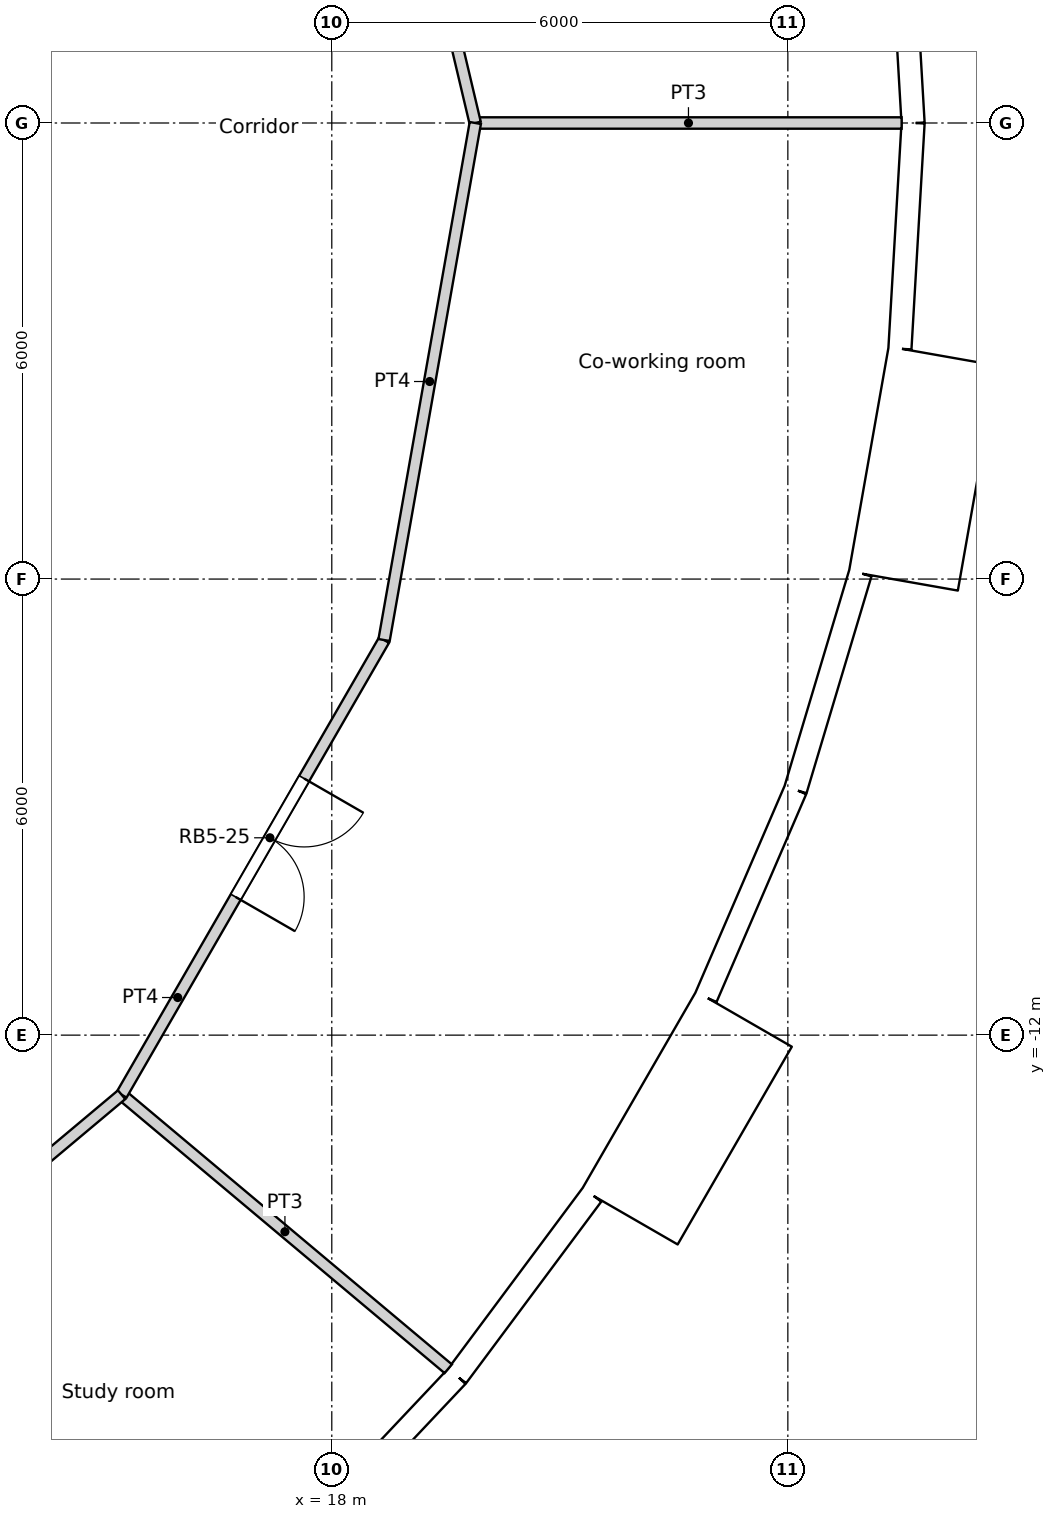
"""IFC4 building model, lengths in metres.
Left out: names, types, materials, properties, quantities, classifications, styles, units other than length and angle.
Written with IfcOpenShell. Run it as: python <this file> out.ifc"""

import sys

from ifc_helpers import new_model, si_unit, direction, frame, frame_2d, origin, origin_2d, place, context, subcontext, project, spatial, rectangle, circle, extrude, element, fill, save


model = new_model("IFC4")
c1 = context("Model", 3, precision=1e-05, world=origin(), true_north=direction((0.0, 1.0)))
c2 = subcontext(c1, "Body", "Model", "MODEL_VIEW")
j1 = project(units=[si_unit("LENGTHUNIT", "METRE"), si_unit("PLANEANGLEUNIT", "RADIAN")], contexts=[c1])
p1 = place(None, origin())
s1 = spatial("IfcSite", under=j1, at=p1, CompositionType="ELEMENT")
p2 = place(p1, origin())
s2 = spatial("IfcBuilding", under=s1, at=p2, CompositionType="ELEMENT")
p3 = place(p2, frame((0.0, 0.0, 169.2)))
s3 = spatial("IfcBuildingStorey", under=s2, at=p3, CompositionType="ELEMENT", Elevation=169.2)
for number, where, z_axis, x_axis in (
    (1, (24.548, 0.0, 0.0), (0.0, 0.0, 1.0), (1.0, 0.0, 0.0)),
    (2, (18.805, -15.779, 0.0), (0.0, 0.0, 1.0), (1.0, 0.0, 0.0)),
    (3, (21.937, -11.017, 0.0), (0.0, 0.0, 1.0), (1.0, 0.0, 0.0)),
    (4, (23.886, -5.661, 0.0), (0.0, 0.0, 1.0), (1.0, 0.0, 0.0)),
):
    element("IfcColumn", number, at=place(p3, frame(where, z_axis=z_axis, x_axis=x_axis)), inside=s3, PredefinedType="COLUMN", context=c2, shape_type="SweptSolid", body=[
        extrude(circle(Radius=0.6, at=origin_2d()), origin(), (0.0, 0.0, 1.0), 3.6),
    ])
for number, where, z_axis, x_axis in (
    (5, (18.822, 0.0, 0.0), (0.0, 0.0, 1.0), (1.0, 0.0, 0.0)),
    (6, (15.552, -10.603, 0.0), (0.0, 0.0, 1.0), (1.0, 0.0, 0.0)),
    (7, (17.986, -5.548, 0.0), (0.0, 0.0, 1.0), (1.0, 0.0, 0.0)),
):
    element("IfcColumn", number, at=place(p3, frame(where, z_axis=z_axis, x_axis=x_axis)), inside=s3, PredefinedType="COLUMN", context=c2, shape_type="SweptSolid", body=[
        extrude(circle(Radius=0.65, at=origin_2d()), origin(), (0.0, 0.0, 1.0), 3.6),
    ])
p4 = place(p3, frame((25.647, 0.0, 0.0), z_axis=(0.0, 0.0, 1.0), x_axis=(-0.058144307138, 0.998308188661, 0.0)))
e8 = element("IfcWall", 8, at=p4, inside=s3, PredefinedType="SOLIDWALL", context=c2, shape_type="SweptSolid", body=[
    extrude(rectangle(XDim=2.973, YDim=0.3, at=frame_2d((1.486, 0.0))), origin(), (0.0, 0.0, 1.0), 3.3),
])
p5 = place(p4, frame((1.486, 0.0, 1.55)))
e9 = element("IfcOpeningElement", 9, at=p5, cuts=e8, PredefinedType="OPENING", context=c2, shape_type="SweptSolid", body=[
    extrude(circle(Radius=0.9, at=origin_2d()), frame((0.0, 0.16, 0.0), z_axis=(0.0, -1.0, 0.0), x_axis=(1.0, 0.0, 0.0)), (0.0, 0.0, 1.0), 0.32),
])
p6 = place(p3, frame((17.607, -18.648, 0.0), z_axis=(0.0, 0.0, 1.0), x_axis=(0.686235184166, 0.727379730273, 0.0)))
e10 = element("IfcWall", 10, at=p6, inside=s3, PredefinedType="SOLIDWALL", context=c2, shape_type="SweptSolid", body=[
    extrude(rectangle(XDim=2.973, YDim=0.3, at=frame_2d((1.486, 0.0))), origin(), (0.0, 0.0, 1.0), 3.3),
])
p7 = place(p6, frame((1.486, 0.0, 1.55)))
e11 = element("IfcOpeningElement", 11, at=p7, cuts=e10, PredefinedType="OPENING", context=c2, shape_type="SweptSolid", body=[
    extrude(circle(Radius=0.9, at=origin_2d()), frame((0.0, 0.16, 0.0), z_axis=(0.0, -1.0, 0.0), x_axis=(1.0, 0.0, 0.0)), (0.0, 0.0, 1.0), 0.32),
])
p8 = place(p3, frame((19.647, -16.486, 0.0), z_axis=(0.0, 0.0, 1.0), x_axis=(0.597197580538, 0.80209416517, 0.0)))
e12 = element("IfcWall", 12, at=p8, inside=s3, PredefinedType="SOLIDWALL", context=c2, shape_type="SweptSolid", body=[
    extrude(rectangle(XDim=2.973, YDim=0.3, at=frame_2d((1.486, 0.0))), origin(), (0.0, 0.0, 1.0), 3.3),
])
p9 = place(p8, frame((1.486, 0.0, 1.55)))
e13 = element("IfcOpeningElement", 13, at=p9, cuts=e12, PredefinedType="OPENING", context=c2, shape_type="SweptSolid", body=[
    extrude(circle(Radius=0.9, at=origin_2d()), frame((0.0, 0.16, 0.0), z_axis=(0.0, -1.0, 0.0), x_axis=(1.0, 0.0, 0.0)), (0.0, 0.0, 1.0), 0.32),
])
p10 = place(p3, frame((21.922, -14.389, -0.3), z_axis=(0.0, 0.0, 1.0), x_axis=(0.499990139034, 0.866031096941, 0.0)))
e14 = element("IfcWall", 14, at=p10, inside=s3, PredefinedType="ELEMENTEDWALL", context=c2, shape_type="SweptSolid", body=[
    extrude(rectangle(XDim=3.0, YDim=1.45, at=frame_2d((1.5, 0.0))), origin(), (0.0, 0.0, 1.0), 3.6),
])
p11 = place(p10, frame((1.5, 0.0, 1.85)))
e15 = element("IfcOpeningElement", 15, at=p11, cuts=e14, PredefinedType="OPENING", context=c2, shape_type="SweptSolid", body=[
    extrude(circle(Radius=0.9, at=origin_2d()), frame((0.0, 0.735, 0.0), z_axis=(0.0, -1.0, 0.0), x_axis=(1.0, 0.0, 0.0)), (0.0, 0.0, 1.0), 1.47),
])
p12 = place(p3, frame((22.923, -11.502, 0.0), z_axis=(0.0, 0.0, 1.0), x_axis=(0.396148129016, 0.918186614952, 0.0)))
e16 = element("IfcWall", 16, at=p12, inside=s3, PredefinedType="SOLIDWALL", context=c2, shape_type="SweptSolid", body=[
    extrude(rectangle(XDim=2.973, YDim=0.3, at=frame_2d((1.486, 0.0))), origin(), (0.0, 0.0, 1.0), 3.3),
])
p13 = place(p12, frame((1.486, 0.0, 1.55)))
e17 = element("IfcOpeningElement", 17, at=p13, cuts=e16, PredefinedType="OPENING", context=c2, shape_type="SweptSolid", body=[
    extrude(circle(Radius=0.9, at=origin_2d()), frame((0.0, 0.16, 0.0), z_axis=(0.0, -1.0, 0.0), x_axis=(1.0, 0.0, 0.0)), (0.0, 0.0, 1.0), 0.32),
])
p14 = place(p3, frame((24.101, -8.772, 0.0), z_axis=(0.0, 0.0, 1.0), x_axis=(0.286782750849, 0.957995643944, 0.0)))
e18 = element("IfcWall", 18, at=p14, inside=s3, PredefinedType="SOLIDWALL", context=c2, shape_type="SweptSolid", body=[
    extrude(rectangle(XDim=2.973, YDim=0.3, at=frame_2d((1.486, 0.0))), origin(), (0.0, 0.0, 1.0), 3.3),
])
p15 = place(p14, frame((1.486, 0.0, 1.55)))
e19 = element("IfcOpeningElement", 19, at=p15, cuts=e18, PredefinedType="OPENING", context=c2, shape_type="SweptSolid", body=[
    extrude(circle(Radius=0.9, at=origin_2d()), frame((0.0, 0.16, 0.0), z_axis=(0.0, -1.0, 0.0), x_axis=(1.0, 0.0, 0.0)), (0.0, 0.0, 1.0), 0.32),
])
p16 = place(p3, frame((25.521, -6.023, -0.3), z_axis=(0.0, 0.0, 1.0), x_axis=(0.173669267716, 0.984804034035, 0.0)))
e20 = element("IfcWall", 20, at=p16, inside=s3, PredefinedType="ELEMENTEDWALL", context=c2, shape_type="SweptSolid", body=[
    extrude(rectangle(XDim=3.0, YDim=1.45, at=frame_2d((1.5, 0.0))), origin(), (0.0, 0.0, 1.0), 3.6),
])
p17 = place(p16, frame((1.5, 0.0, 1.85)))
e21 = element("IfcOpeningElement", 21, at=p17, cuts=e20, PredefinedType="OPENING", context=c2, shape_type="SweptSolid", body=[
    extrude(circle(Radius=0.9, at=origin_2d()), frame((0.0, 0.735, 0.0), z_axis=(0.0, -1.0, 0.0), x_axis=(1.0, 0.0, 0.0)), (0.0, 0.0, 1.0), 1.47),
])
p18 = place(p3, frame((25.475, -2.968, 0.0), z_axis=(0.0, 0.0, 1.0), x_axis=(0.058144307138, 0.998308188661, 0.0)))
e22 = element("IfcWall", 22, at=p18, inside=s3, PredefinedType="SOLIDWALL", context=c2, shape_type="SweptSolid", body=[
    extrude(rectangle(XDim=2.973, YDim=0.3, at=frame_2d((1.486, 0.0))), origin(), (0.0, 0.0, 1.0), 3.3),
])
p19 = place(p18, frame((1.486, 0.0, 1.55)))
e23 = element("IfcOpeningElement", 23, at=p19, cuts=e22, PredefinedType="OPENING", context=c2, shape_type="SweptSolid", body=[
    extrude(circle(Radius=0.9, at=origin_2d()), frame((0.0, 0.16, 0.0), z_axis=(0.0, -1.0, 0.0), x_axis=(1.0, 0.0, 0.0)), (0.0, 0.0, 1.0), 0.32),
])
p20 = place(p3, frame((17.772, 8.926, 0.0), z_axis=(0.0, 0.0, 1.0), x_axis=(0.230531374136, -0.973064892769, 0.0)))
e24 = element("IfcWall", 24, at=p20, inside=s3, PredefinedType="PARTITIONING", context=c2, shape_type="SweptSolid", body=[
    extrude(rectangle(XDim=9.173, YDim=0.15, at=frame_2d((4.587, 0.0))), origin(), (0.0, 0.0, 1.0), 3.3),
])
p21 = place(p20, frame((0.973, 0.0, 0.0)))
e25 = element("IfcOpeningElement", 25, at=p21, cuts=e24, PredefinedType="OPENING", context=c2, shape_type="SweptSolid", body=[
    extrude(rectangle(XDim=1.0, YDim=2.1, at=frame_2d((0.5, 1.05))), frame((0.0, 0.075, 0.0), z_axis=(0.0, -1.0, 0.0), x_axis=(1.0, 0.0, 0.0)), (0.0, 0.0, 1.0), 0.15),
])
p22 = place(p3, frame((9.943, -17.222, 0.0), z_axis=(0.0, 0.0, 1.0), x_axis=(0.766192104565, 0.642611592567, 0.0)))
e26 = element("IfcWall", 26, at=p22, inside=s3, PredefinedType="PARTITIONING", context=c2, shape_type="SweptSolid", body=[
    extrude(rectangle(XDim=6.906, YDim=0.15, at=frame_2d((3.453, 0.0))), origin(), (0.0, 0.0, 1.0), 3.3),
])
p23 = place(p22, frame((0.984, 0.0, 0.0)))
e27 = element("IfcOpeningElement", 27, at=p23, cuts=e26, PredefinedType="OPENING", context=c2, shape_type="SweptSolid", body=[
    extrude(rectangle(XDim=1.0, YDim=2.04, at=frame_2d((0.5, 1.02))), frame((0.0, 0.075, 0.0), z_axis=(0.0, -1.0, 0.0), x_axis=(1.0, 0.0, 0.0)), (0.0, 0.0, 1.0), 0.15),
])
p24 = place(p3, frame((18.688, -6.802, 0.0), z_axis=(0.0, 0.0, 1.0), x_axis=(0.173728873845, 0.98479352069, 0.0)))
e28 = element("IfcWall", 28, at=p24, inside=s3, PredefinedType="PARTITIONING", context=c2, shape_type="SweptSolid", body=[
    extrude(rectangle(XDim=6.907, YDim=0.15, at=frame_2d((3.454, 0.0))), origin(), (0.0, 0.0, 1.0), 3.3),
])
p25 = place(p3, frame((15.235, -12.784, 0.0), z_axis=(0.0, 0.0, 1.0), x_axis=(0.499914202267, 0.866074933462, 0.0)))
e29 = element("IfcWall", 29, at=p25, inside=s3, PredefinedType="PARTITIONING", context=c2, shape_type="SweptSolid", body=[
    extrude(rectangle(XDim=6.907, YDim=0.15, at=frame_2d((3.454, 0.0))), origin(), (0.0, 0.0, 1.0), 3.3),
])
p26 = place(p25, frame((3.003, 0.0, 0.0)))
e30 = element("IfcOpeningElement", 30, at=p26, cuts=e29, PredefinedType="OPENING", context=c2, shape_type="SweptSolid", body=[
    extrude(rectangle(XDim=1.8, YDim=2.1, at=frame_2d((0.9, 1.05))), frame((0.0, 0.075, 0.0), z_axis=(0.0, -1.0, 0.0), x_axis=(1.0, 0.0, 0.0)), (0.0, 0.0, 1.0), 0.15),
])
p27 = place(p3, frame((19.888, 0.0, 0.0), z_axis=(0.0, 0.0, 1.0), x_axis=(1.0, 0.0, 0.0)))
e31 = element("IfcWall", 31, at=p27, inside=s3, PredefinedType="PARTITIONING", context=c2, shape_type="SweptSolid", body=[
    extrude(rectangle(XDim=5.609, YDim=0.15, at=frame_2d((2.805, 0.0))), origin(), (0.0, 0.0, 1.0), 3.3),
])
p28 = place(p3, frame((15.235, -12.784, 0.0), z_axis=(0.0, 0.0, 1.0), x_axis=(0.76609059793, -0.642732600514, 0.0)))
e32 = element("IfcWall", 32, at=p28, inside=s3, PredefinedType="PARTITIONING", context=c2, shape_type="SweptSolid", body=[
    extrude(rectangle(XDim=5.609, YDim=0.15, at=frame_2d((2.804, 0.0))), origin(), (0.0, 0.0, 1.0), 3.3),
])
p29 = place(p5, origin())
e33 = element("IfcWindow", 33, at=p29, inside=s3, PartitioningType="SINGLE_PANEL", PredefinedType="WINDOW", context=c2, shape_type="SweptSolid", body=[
    extrude(circle(Radius=0.9, at=origin_2d()), frame((0.0, 0.12, 0.0), z_axis=(0.0, -1.0, 0.0), x_axis=(1.0, 0.0, 0.0)), (0.0, 0.0, 1.0), 0.1),
])
fill(e9, e33)
p30 = place(p7, origin())
e34 = element("IfcWindow", 34, at=p30, inside=s3, PartitioningType="SINGLE_PANEL", PredefinedType="WINDOW", context=c2, shape_type="SweptSolid", body=[
    extrude(circle(Radius=0.9, at=origin_2d()), frame((0.0, 0.12, 0.0), z_axis=(0.0, -1.0, 0.0), x_axis=(1.0, 0.0, 0.0)), (0.0, 0.0, 1.0), 0.1),
])
fill(e11, e34)
p31 = place(p9, origin())
e35 = element("IfcWindow", 35, at=p31, inside=s3, PartitioningType="SINGLE_PANEL", PredefinedType="WINDOW", context=c2, shape_type="SweptSolid", body=[
    extrude(circle(Radius=0.9, at=origin_2d()), frame((0.0, 0.12, 0.0), z_axis=(0.0, -1.0, 0.0), x_axis=(1.0, 0.0, 0.0)), (0.0, 0.0, 1.0), 0.1),
])
fill(e13, e35)
p32 = place(p11, origin())
e36 = element("IfcWindow", 36, at=p32, inside=s3, PartitioningType="SINGLE_PANEL", PredefinedType="WINDOW", context=c2, shape_type="SweptSolid", body=[
    extrude(circle(Radius=0.9, at=origin_2d()), frame((0.0, 0.695, 0.0), z_axis=(0.0, -1.0, 0.0), x_axis=(1.0, 0.0, 0.0)), (0.0, 0.0, 1.0), 0.1),
])
fill(e15, e36)
p33 = place(p13, origin())
e37 = element("IfcWindow", 37, at=p33, inside=s3, PartitioningType="SINGLE_PANEL", PredefinedType="WINDOW", context=c2, shape_type="SweptSolid", body=[
    extrude(circle(Radius=0.9, at=origin_2d()), frame((0.0, 0.12, 0.0), z_axis=(0.0, -1.0, 0.0), x_axis=(1.0, 0.0, 0.0)), (0.0, 0.0, 1.0), 0.1),
])
fill(e17, e37)
p34 = place(p15, origin())
e38 = element("IfcWindow", 38, at=p34, inside=s3, PartitioningType="SINGLE_PANEL", PredefinedType="WINDOW", context=c2, shape_type="SweptSolid", body=[
    extrude(circle(Radius=0.9, at=origin_2d()), frame((0.0, 0.12, 0.0), z_axis=(0.0, -1.0, 0.0), x_axis=(1.0, 0.0, 0.0)), (0.0, 0.0, 1.0), 0.1),
])
fill(e19, e38)
p35 = place(p17, origin())
e39 = element("IfcWindow", 39, at=p35, inside=s3, PartitioningType="SINGLE_PANEL", PredefinedType="WINDOW", context=c2, shape_type="SweptSolid", body=[
    extrude(circle(Radius=0.9, at=origin_2d()), frame((0.0, 0.695, 0.0), z_axis=(0.0, -1.0, 0.0), x_axis=(1.0, 0.0, 0.0)), (0.0, 0.0, 1.0), 0.1),
])
fill(e21, e39)
p36 = place(p19, origin())
e40 = element("IfcWindow", 40, at=p36, inside=s3, PartitioningType="SINGLE_PANEL", PredefinedType="WINDOW", context=c2, shape_type="SweptSolid", body=[
    extrude(circle(Radius=0.9, at=origin_2d()), frame((0.0, 0.12, 0.0), z_axis=(0.0, -1.0, 0.0), x_axis=(1.0, 0.0, 0.0)), (0.0, 0.0, 1.0), 0.1),
])
fill(e23, e40)
p37 = place(p26, origin())
e41 = element("IfcDoor", 41, at=p37, inside=s3, OperationType="DOUBLE_DOOR_SINGLE_SWING", PredefinedType="DOOR", context=c2, shape_type="SweptSolid", body=[
    extrude(rectangle(XDim=1.8, YDim=2.1, at=frame_2d((0.9, 1.05))), frame((0.0, 0.025, 0.0), z_axis=(0.0, -1.0, 0.0), x_axis=(1.0, 0.0, 0.0)), (0.0, 0.0, 1.0), 0.05),
])
fill(e30, e41)
save(model, sys.argv[1])
